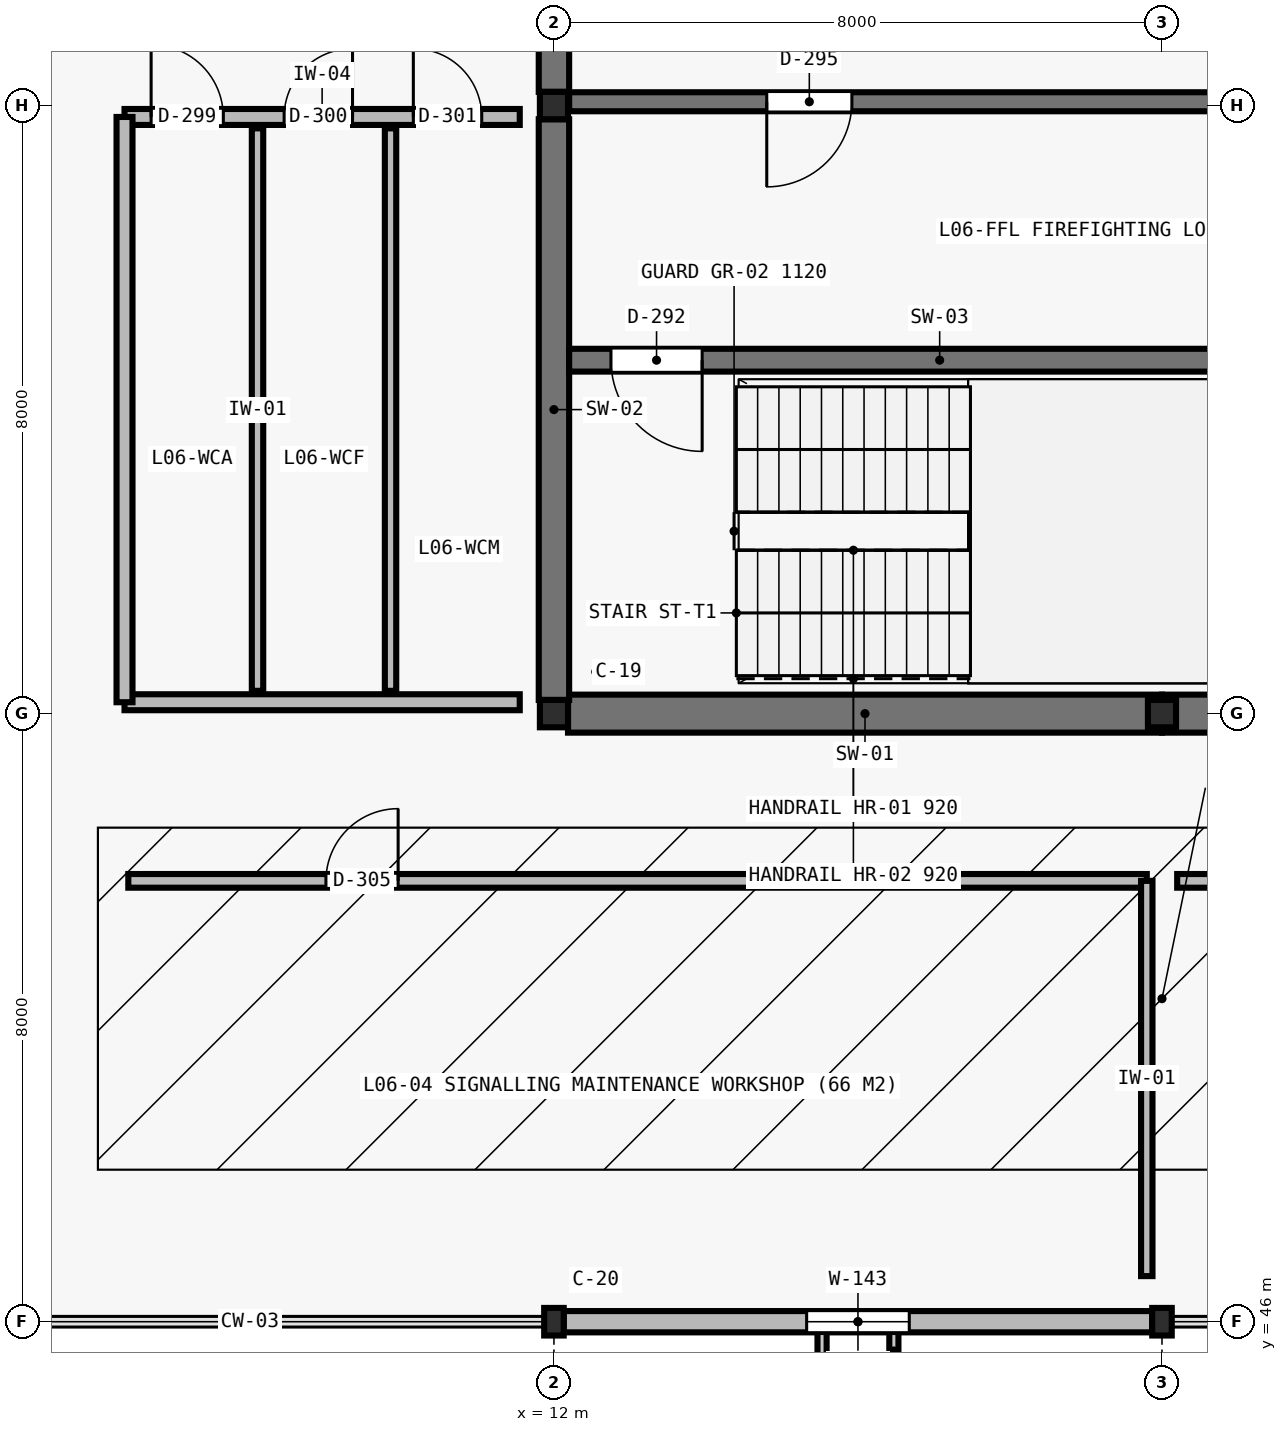
"""IFC4 building model, lengths in metres.
Left out: names, types, materials, properties, quantities, classifications, styles, units other than length and angle.
Written with IfcOpenShell. Run it as: python <this file> out.ifc"""

import sys

from ifc_helpers import new_model, si_unit, direction, frame, frame_2d, origin, origin_2d, place, context, subcontext, project, spatial, rectangle, i_section, extrude, element, fill, save


model = new_model("IFC4")
c1 = context("Model", 3, precision=1e-05, world=origin(), true_north=direction((0.0, 1.0)))
c2 = subcontext(c1, "Body", "Model", "MODEL_VIEW")
j1 = project(units=[si_unit("LENGTHUNIT", "METRE"), si_unit("PLANEANGLEUNIT", "RADIAN")], contexts=[c1])
p1 = place(None, origin())
s1 = spatial("IfcSite", under=j1, at=p1, CompositionType="ELEMENT")
p2 = place(p1, origin())
s2 = spatial("IfcBuilding", under=s1, at=p2, CompositionType="ELEMENT")
p3 = place(p2, frame((0.0, 0.0, 28.0)))
s3 = spatial("IfcBuildingStorey", under=s2, at=p3, CompositionType="ELEMENT", Elevation=28.0)
p4 = place(p3, frame((12.0, 46.0, 0.0), z_axis=(0.0, 0.0, 1.0), x_axis=(1.0, 0.0, 0.0)))
e1 = element("IfcColumn", 1, at=p4, inside=s3, PredefinedType="COLUMN", context=c2, shape_type="SweptSolid", body=[
    extrude(i_section(OverallWidth=0.257, OverallDepth=0.363, WebThickness=0.013, FlangeThickness=0.022, at=origin_2d()), origin(), (0.0, 0.0, 1.0), 3.98),
])
for number, where, z_axis, x_axis in (
    (2, (12.0, 54.0, 0.0), (0.0, 0.0, 1.0), (1.0, 0.0, 0.0)),
    (3, (12.0, 62.0, 0.0), (0.0, 0.0, 1.0), (1.0, 0.0, 0.0)),
):
    element("IfcColumn", number, at=place(p3, frame(where, z_axis=z_axis, x_axis=x_axis)), inside=s3, PredefinedType="COLUMN", context=c2, shape_type="SweptSolid", body=[
        extrude(i_section(OverallWidth=0.37, OverallDepth=0.36, WebThickness=0.012, FlangeThickness=0.02, at=origin_2d()), origin(), (0.0, 0.0, 1.0), 3.98),
    ])
p5 = place(p3, frame((20.0, 46.0, 0.0), z_axis=(0.0, 0.0, 1.0), x_axis=(1.0, 0.0, 0.0)))
e4 = element("IfcColumn", 4, at=p5, inside=s3, PredefinedType="COLUMN", context=c2, shape_type="SweptSolid", body=[
    extrude(i_section(OverallWidth=0.257, OverallDepth=0.363, WebThickness=0.013, FlangeThickness=0.022, at=origin_2d()), origin(), (0.0, 0.0, 1.0), 3.98),
])
p6 = place(p3, frame((20.0, 54.0, 0.0), z_axis=(0.0, 0.0, 1.0), x_axis=(1.0, 0.0, 0.0)))
e5 = element("IfcColumn", 5, at=p6, inside=s3, PredefinedType="COLUMN", context=c2, shape_type="SweptSolid", body=[
    extrude(i_section(OverallWidth=0.37, OverallDepth=0.36, WebThickness=0.012, FlangeThickness=0.02, at=origin_2d()), origin(), (0.0, 0.0, 1.0), 3.98),
])
p7 = place(p3, frame((12.185, 54.0, 0.0), z_axis=(0.0, 0.0, 1.0), x_axis=(1.0, 0.0, 0.0)))
e6 = element("IfcWall", 6, at=p7, inside=s3, PredefinedType="SHEAR", context=c2, shape_type="SweptSolid", body=[
    extrude(rectangle(XDim=7.815, YDim=0.5, at=frame_2d((3.907, 0.0))), origin(), (0.0, 0.0, 1.0), 3.98),
])
p8 = place(p3, frame((20.0, 54.0, 0.0), z_axis=(0.0, 0.0, 1.0), x_axis=(1.0, 0.0, 0.0)))
e7 = element("IfcWall", 7, at=p8, inside=s3, PredefinedType="SHEAR", context=c2, shape_type="SweptSolid", body=[
    extrude(rectangle(XDim=8.0, YDim=0.5, at=frame_2d((4.0, 0.0))), origin(), (0.0, 0.0, 1.0), 3.98),
])
p9 = place(p3, frame((12.0, 54.18, 0.0), z_axis=(0.0, 0.0, 1.0), x_axis=(0.0, 1.0, 0.0)))
e8 = element("IfcWall", 8, at=p9, inside=s3, PredefinedType="SHEAR", context=c2, shape_type="SweptSolid", body=[
    extrude(rectangle(XDim=7.64, YDim=0.4, at=frame_2d((3.82, 0.0))), origin(), (0.0, 0.0, 1.0), 3.98),
])
p10 = place(p3, frame((12.0, 62.18, 0.0), z_axis=(0.0, 0.0, 1.0), x_axis=(0.0, 1.0, 0.0)))
e9 = element("IfcWall", 9, at=p10, inside=s3, PredefinedType="SHEAR", context=c2, shape_type="SweptSolid", body=[
    extrude(rectangle(XDim=7.64, YDim=0.4, at=frame_2d((3.82, 0.0))), origin(), (0.0, 0.0, 1.0), 3.98),
])
p11 = place(p10, frame((0.72, 0.0, 0.0)))
e10 = element("IfcOpeningElement", 10, at=p11, cuts=e9, PredefinedType="OPENING", context=c2, shape_type="SweptSolid", body=[
    extrude(rectangle(XDim=1.8, YDim=2.2, at=frame_2d((0.9, 1.1))), frame((0.0, 0.21, 0.0), z_axis=(0.0, -1.0, 0.0), x_axis=(1.0, 0.0, 0.0)), (0.0, 0.0, 1.0), 0.42),
])
p12 = place(p3, frame((12.2, 58.65, 0.0), z_axis=(0.0, 0.0, 1.0), x_axis=(1.0, 0.0, 0.0)))
e11 = element("IfcWall", 11, at=p12, inside=s3, PredefinedType="SHEAR", context=c2, shape_type="SweptSolid", body=[
    extrude(rectangle(XDim=9.75, YDim=0.3, at=frame_2d((4.875, 0.0))), origin(), (0.0, 0.0, 1.0), 3.98),
])
p13 = place(p12, frame((0.55, 0.0, 0.0)))
e12 = element("IfcOpeningElement", 12, at=p13, cuts=e11, PredefinedType="OPENING", context=c2, shape_type="SweptSolid", body=[
    extrude(rectangle(XDim=1.2, YDim=2.2, at=frame_2d((0.6, 1.1))), frame((0.0, 0.16, 0.0), z_axis=(0.0, -1.0, 0.0), x_axis=(1.0, 0.0, 0.0)), (0.0, 0.0, 1.0), 0.32),
])
p14 = place(p3, frame((12.2, 62.05, 0.0), z_axis=(0.0, 0.0, 1.0), x_axis=(1.0, 0.0, 0.0)))
e13 = element("IfcWall", 13, at=p14, inside=s3, PredefinedType="SHEAR", context=c2, shape_type="SweptSolid", body=[
    extrude(rectangle(XDim=16.55, YDim=0.25, at=frame_2d((8.275, 0.0))), origin(), (0.0, 0.0, 1.0), 3.98),
])
p15 = place(p14, frame((2.6, 0.0, 0.0)))
e14 = element("IfcOpeningElement", 14, at=p15, cuts=e13, PredefinedType="OPENING", context=c2, shape_type="SweptSolid", body=[
    extrude(rectangle(XDim=1.12, YDim=2.22, at=frame_2d((0.56, 1.11))), frame((0.0, 0.135, 0.0), z_axis=(0.0, -1.0, 0.0), x_axis=(1.0, 0.0, 0.0)), (0.0, 0.0, 1.0), 0.27),
])
p16 = place(p14, frame((11.2, 0.0, 0.0)))
e15 = element("IfcOpeningElement", 15, at=p16, cuts=e13, PredefinedType="OPENING", context=c2, shape_type="SweptSolid", body=[
    extrude(rectangle(XDim=1.12, YDim=2.22, at=frame_2d((0.56, 1.11))), frame((0.0, 0.135, 0.0), z_axis=(0.0, -1.0, 0.0), x_axis=(1.0, 0.0, 0.0)), (0.0, 0.0, 1.0), 0.27),
])
p17 = place(p3, frame((19.872, 46.0, 0.0), z_axis=(0.0, 0.0, 1.0), x_axis=(-1.0, 0.0, 0.0)))
e16 = element("IfcWall", 16, at=p17, inside=s3, PredefinedType="STANDARD", context=c2, shape_type="SweptSolid", body=[
    extrude(rectangle(XDim=7.743, YDim=0.28, at=frame_2d((3.872, 0.0))), origin(), (0.0, 0.0, 1.0), 3.52),
])
p18 = place(p17, frame((3.197, 0.0, 0.95)))
e17 = element("IfcOpeningElement", 17, at=p18, cuts=e16, PredefinedType="OPENING", context=c2, shape_type="SweptSolid", body=[
    extrude(rectangle(XDim=1.35, YDim=2.05, at=frame_2d((0.675, 1.025))), frame((0.0, 0.15, 0.0), z_axis=(0.0, -1.0, 0.0), x_axis=(1.0, 0.0, 0.0)), (0.0, 0.0, 1.0), 0.3),
])
p19 = place(p3, frame((6.35, 61.85, 0.0), z_axis=(0.0, 0.0, 1.0), x_axis=(1.0, 0.0, 0.0)))
e18 = element("IfcWall", 18, at=p19, inside=s3, PredefinedType="PLUMBINGWALL", context=c2, shape_type="SweptSolid", body=[
    extrude(rectangle(XDim=5.2, YDim=0.21, at=frame_2d((2.6, 0.0))), origin(), (0.0, 0.0, 1.0), 3.98),
])
p20 = place(p19, frame((0.35, 0.0, 0.0)))
e19 = element("IfcOpeningElement", 19, at=p20, cuts=e18, PredefinedType="OPENING", context=c2, shape_type="SweptSolid", body=[
    extrude(rectangle(XDim=0.95, YDim=2.1, at=frame_2d((0.475, 1.05))), frame((0.0, 0.115, 0.0), z_axis=(0.0, -1.0, 0.0), x_axis=(1.0, 0.0, 0.0)), (0.0, 0.0, 1.0), 0.23),
])
p21 = place(p19, frame((2.1, 0.0, 0.0)))
e20 = element("IfcOpeningElement", 20, at=p21, cuts=e18, PredefinedType="OPENING", context=c2, shape_type="SweptSolid", body=[
    extrude(rectangle(XDim=0.9, YDim=2.1, at=frame_2d((0.45, 1.05))), frame((0.0, 0.115, 0.0), z_axis=(0.0, -1.0, 0.0), x_axis=(1.0, 0.0, 0.0)), (0.0, 0.0, 1.0), 0.23),
])
p22 = place(p19, frame((3.8, 0.0, 0.0)))
e21 = element("IfcOpeningElement", 21, at=p22, cuts=e18, PredefinedType="OPENING", context=c2, shape_type="SweptSolid", body=[
    extrude(rectangle(XDim=0.9, YDim=2.1, at=frame_2d((0.45, 1.05))), frame((0.0, 0.115, 0.0), z_axis=(0.0, -1.0, 0.0), x_axis=(1.0, 0.0, 0.0)), (0.0, 0.0, 1.0), 0.23),
])
p23 = place(p3, frame((6.35, 54.15, 0.0), z_axis=(0.0, 0.0, 1.0), x_axis=(1.0, 0.0, 0.0)))
e22 = element("IfcWall", 22, at=p23, inside=s3, PredefinedType="PLUMBINGWALL", context=c2, shape_type="SweptSolid", body=[
    extrude(rectangle(XDim=5.2, YDim=0.21, at=frame_2d((2.6, 0.0))), origin(), (0.0, 0.0, 1.0), 3.98),
])
p24 = place(p3, frame((6.35, 54.15, 0.0), z_axis=(0.0, 0.0, 1.0), x_axis=(0.0, 1.0, 0.0)))
e23 = element("IfcWall", 23, at=p24, inside=s3, PredefinedType="PLUMBINGWALL", context=c2, shape_type="SweptSolid", body=[
    extrude(rectangle(XDim=7.7, YDim=0.21, at=frame_2d((3.85, 0.0))), origin(), (0.0, 0.0, 1.0), 3.98),
])
for number, where, z_axis, x_axis in (
    (24, (8.1, 54.3, 0.0), (0.0, 0.0, 1.0), (0.0, 1.0, 0.0)),
    (25, (9.85, 54.3, 0.0), (0.0, 0.0, 1.0), (0.0, 1.0, 0.0)),
):
    element("IfcWall", number, at=place(p3, frame(where, z_axis=z_axis, x_axis=x_axis)), inside=s3, PredefinedType="PARTITIONING", context=c2, shape_type="SweptSolid", body=[
        extrude(rectangle(XDim=7.4, YDim=0.15, at=frame_2d((3.7, 0.0))), origin(), (0.0, 0.0, 1.0), 3.98),
    ])
p25 = place(p3, frame((6.4, 51.8, 0.0), z_axis=(0.0, 0.0, 1.0), x_axis=(1.0, 0.0, 0.0)))
e26 = element("IfcWall", 26, at=p25, inside=s3, PredefinedType="PARTITIONING", context=c2, shape_type="SweptSolid", body=[
    extrude(rectangle(XDim=13.4, YDim=0.18, at=frame_2d((6.7, 0.0))), origin(), (0.0, 0.0, 1.0), 3.98),
])
p26 = place(p25, frame((2.6, 0.0, 0.0)))
e27 = element("IfcOpeningElement", 27, at=p26, cuts=e26, PredefinedType="OPENING", context=c2, shape_type="SweptSolid", body=[
    extrude(rectangle(XDim=0.95, YDim=2.1, at=frame_2d((0.475, 1.05))), frame((0.0, 0.1, 0.0), z_axis=(0.0, -1.0, 0.0), x_axis=(1.0, 0.0, 0.0)), (0.0, 0.0, 1.0), 0.2),
])
p27 = place(p3, frame((19.8, 46.6, 0.0), z_axis=(0.0, 0.0, 1.0), x_axis=(0.0, 1.0, 0.0)))
e28 = element("IfcWall", 28, at=p27, inside=s3, PredefinedType="PARTITIONING", context=c2, shape_type="SweptSolid", body=[
    extrude(rectangle(XDim=5.2, YDim=0.15, at=frame_2d((2.6, 0.0))), origin(), (0.0, 0.0, 1.0), 3.98),
])
p28 = place(p3, frame((20.2, 51.8, 0.0), z_axis=(0.0, 0.0, 1.0), x_axis=(1.0, 0.0, 0.0)))
e29 = element("IfcWall", 29, at=p28, inside=s3, PredefinedType="PARTITIONING", context=c2, shape_type="SweptSolid", body=[
    extrude(rectangle(XDim=15.2, YDim=0.18, at=frame_2d((7.6, 0.0))), origin(), (0.0, 0.0, 1.0), 3.98),
])
p29 = place(p28, frame((2.6, 0.0, 0.0)))
e30 = element("IfcOpeningElement", 30, at=p29, cuts=e29, PredefinedType="OPENING", context=c2, shape_type="SweptSolid", body=[
    extrude(rectangle(XDim=0.95, YDim=2.1, at=frame_2d((0.475, 1.05))), frame((0.0, 0.1, 0.0), z_axis=(0.0, -1.0, 0.0), x_axis=(1.0, 0.0, 0.0)), (0.0, 0.0, 1.0), 0.2),
])
p30 = place(p18, origin())
e31 = element("IfcWindow", 31, at=p30, inside=s3, PartitioningType="SINGLE_PANEL", PredefinedType="WINDOW", context=c2, shape_type="SweptSolid", body=[
    extrude(rectangle(XDim=1.35, YDim=2.05, at=frame_2d((0.675, 1.025))), frame((0.0, 0.03, 0.0), z_axis=(0.0, -1.0, 0.0), x_axis=(1.0, 0.0, 0.0)), (0.0, 0.0, 1.0), 0.06),
])
fill(e17, e31)
p31 = place(p13, frame((1.2, 0.0, 0.0), z_axis=(0.0, 0.0, 1.0), x_axis=(-1.0, 0.0, 0.0)))
e32 = element("IfcDoor", 32, at=p31, inside=s3, OperationType="SINGLE_SWING_LEFT", PredefinedType="DOOR", context=c2, shape_type="SweptSolid", body=[
    extrude(rectangle(XDim=1.2, YDim=2.2, at=frame_2d((0.6, 1.1))), frame((0.0, 0.025, 0.0), z_axis=(0.0, -1.0, 0.0), x_axis=(1.0, 0.0, 0.0)), (0.0, 0.0, 1.0), 0.05),
])
fill(e12, e32)
p32 = place(p15, frame((1.12, 0.0, 0.0), z_axis=(0.0, 0.0, 1.0), x_axis=(-1.0, 0.0, 0.0)))
e33 = element("IfcDoor", 33, at=p32, inside=s3, OperationType="SINGLE_SWING_RIGHT", PredefinedType="DOOR", context=c2, shape_type="SweptSolid", body=[
    extrude(rectangle(XDim=1.12, YDim=2.22, at=frame_2d((0.56, 1.11))), frame((0.0, 0.025, 0.0), z_axis=(0.0, -1.0, 0.0), x_axis=(1.0, 0.0, 0.0)), (0.0, 0.0, 1.0), 0.05),
])
fill(e14, e33)
p33 = place(p20, origin())
e34 = element("IfcDoor", 34, at=p33, inside=s3, OperationType="SINGLE_SWING_LEFT", PredefinedType="DOOR", context=c2, shape_type="SweptSolid", body=[
    extrude(rectangle(XDim=0.95, YDim=2.1, at=frame_2d((0.475, 1.05))), frame((0.0, 0.025, 0.0), z_axis=(0.0, -1.0, 0.0), x_axis=(1.0, 0.0, 0.0)), (0.0, 0.0, 1.0), 0.05),
])
fill(e19, e34)
p34 = place(p21, origin())
e35 = element("IfcDoor", 35, at=p34, inside=s3, OperationType="SINGLE_SWING_RIGHT", PredefinedType="DOOR", context=c2, shape_type="SweptSolid", body=[
    extrude(rectangle(XDim=0.9, YDim=2.1, at=frame_2d((0.45, 1.05))), frame((0.0, 0.025, 0.0), z_axis=(0.0, -1.0, 0.0), x_axis=(1.0, 0.0, 0.0)), (0.0, 0.0, 1.0), 0.05),
])
fill(e20, e35)
p35 = place(p22, origin())
e36 = element("IfcDoor", 36, at=p35, inside=s3, OperationType="SINGLE_SWING_LEFT", PredefinedType="DOOR", context=c2, shape_type="SweptSolid", body=[
    extrude(rectangle(XDim=0.9, YDim=2.1, at=frame_2d((0.45, 1.05))), frame((0.0, 0.025, 0.0), z_axis=(0.0, -1.0, 0.0), x_axis=(1.0, 0.0, 0.0)), (0.0, 0.0, 1.0), 0.05),
])
fill(e21, e36)
p36 = place(p26, origin())
e37 = element("IfcDoor", 37, at=p36, inside=s3, OperationType="SINGLE_SWING_RIGHT", PredefinedType="DOOR", context=c2, shape_type="SweptSolid", body=[
    extrude(rectangle(XDim=0.95, YDim=2.1, at=frame_2d((0.475, 1.05))), frame((0.0, 0.025, 0.0), z_axis=(0.0, -1.0, 0.0), x_axis=(1.0, 0.0, 0.0)), (0.0, 0.0, 1.0), 0.05),
])
fill(e27, e37)
save(model, sys.argv[1])
